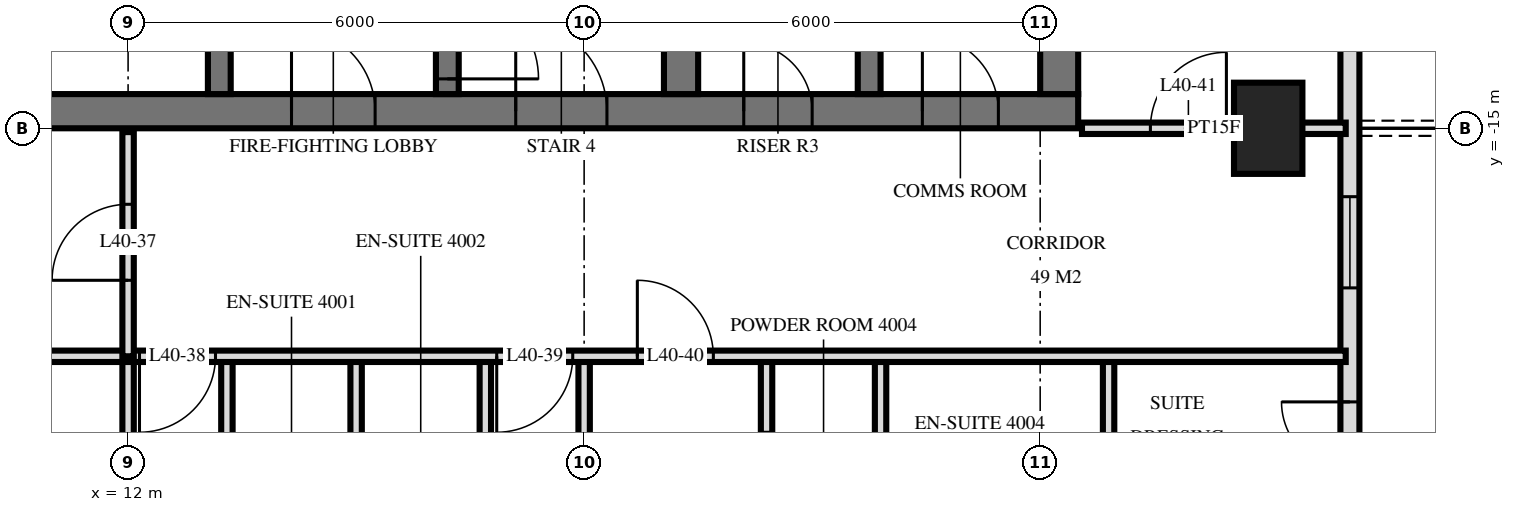
"""IFC4 building model, lengths in metres.
Left out: names, types, materials, properties, quantities, classifications, styles, units other than length and angle.
Written with IfcOpenShell. Run it as: python <this file> out.ifc"""

import sys

from ifc_helpers import new_model, si_unit, direction, frame, frame_2d, origin, origin_2d, place, context, subcontext, project, spatial, rectangle, extrude, element, fill, save


model = new_model("IFC4")
c1 = context("Model", 3, precision=1e-05, world=origin(), true_north=direction((0.0, 1.0)))
c2 = subcontext(c1, "Body", "Model", "MODEL_VIEW")
j1 = project(units=[si_unit("LENGTHUNIT", "METRE"), si_unit("PLANEANGLEUNIT", "RADIAN")], contexts=[c1])
p1 = place(None, origin())
s1 = spatial("IfcSite", under=j1, at=p1, CompositionType="ELEMENT")
p2 = place(p1, origin())
s2 = spatial("IfcBuilding", under=s1, at=p2, CompositionType="ELEMENT")
p3 = place(p2, frame((0.0, 0.0, 156.0)))
s3 = spatial("IfcBuildingStorey", under=s2, at=p3, CompositionType="ELEMENT", Elevation=156.0)
p4 = place(p3, frame((27.0, -15.0, 0.0), z_axis=(0.0, 0.0, 1.0), x_axis=(0.0, 1.0, 0.0)))
e1 = element("IfcColumn", 1, at=p4, inside=s3, PredefinedType="COLUMN", context=c2, shape_type="SweptSolid", body=[
    extrude(rectangle(XDim=1.2, YDim=0.9, at=origin_2d()), origin(), (0.0, 0.0, 1.0), 3.6),
])
p5 = place(p3, frame((10.0, -14.775, 0.0), z_axis=(0.0, 0.0, 1.0), x_axis=(1.0, 0.0, 0.0)))
e2 = element("IfcWall", 2, at=p5, inside=s3, PredefinedType="SHEAR", context=c2, shape_type="SweptSolid", body=[
    extrude(rectangle(XDim=14.5, YDim=0.45, at=frame_2d((7.25, 0.0))), origin(), (0.0, 0.0, 1.0), 3.6),
])
p6 = place(p5, frame((7.1, 0.0, 0.0)))
e3 = element("IfcOpeningElement", 3, at=p6, cuts=e2, PredefinedType="OPENING", context=c2, shape_type="SweptSolid", body=[
    extrude(rectangle(XDim=1.2, YDim=2.1, at=frame_2d((0.6, 1.05))), frame((0.0, 0.235, 0.0), z_axis=(0.0, -1.0, 0.0), x_axis=(1.0, 0.0, 0.0)), (0.0, 0.0, 1.0), 0.47),
])
p7 = place(p5, frame((4.15, 0.0, 0.0)))
e4 = element("IfcOpeningElement", 4, at=p7, cuts=e2, PredefinedType="OPENING", context=c2, shape_type="SweptSolid", body=[
    extrude(rectangle(XDim=1.1, YDim=2.1, at=frame_2d((0.55, 1.05))), frame((0.0, 0.235, 0.0), z_axis=(0.0, -1.0, 0.0), x_axis=(1.0, 0.0, 0.0)), (0.0, 0.0, 1.0), 0.47),
])
p8 = place(p5, frame((10.1, 0.0, 0.0)))
e5 = element("IfcOpeningElement", 5, at=p8, cuts=e2, PredefinedType="OPENING", context=c2, shape_type="SweptSolid", body=[
    extrude(rectangle(XDim=0.9, YDim=2.1, at=frame_2d((0.45, 1.05))), frame((0.0, 0.235, 0.0), z_axis=(0.0, -1.0, 0.0), x_axis=(1.0, 0.0, 0.0)), (0.0, 0.0, 1.0), 0.47),
])
p9 = place(p5, frame((12.45, 0.0, 0.0)))
e6 = element("IfcOpeningElement", 6, at=p9, cuts=e2, PredefinedType="OPENING", context=c2, shape_type="SweptSolid", body=[
    extrude(rectangle(XDim=1.0, YDim=2.1, at=frame_2d((0.5, 1.05))), frame((0.0, 0.235, 0.0), z_axis=(0.0, -1.0, 0.0), x_axis=(1.0, 0.0, 0.0)), (0.0, 0.0, 1.0), 0.47),
])
p10 = place(p3, frame((24.25, -14.55, 0.0), z_axis=(0.0, 0.0, 1.0), x_axis=(0.0, 1.0, 0.0)))
e7 = element("IfcWall", 7, at=p10, inside=s3, PredefinedType="SHEAR", context=c2, shape_type="SweptSolid", body=[
    extrude(rectangle(XDim=14.1, YDim=0.5, at=frame_2d((7.05, 0.0))), origin(), (0.0, 0.0, 1.0), 3.6),
])
p11 = place(p3, frame((13.2, -14.55, 0.0), z_axis=(0.0, 0.0, 1.0), x_axis=(0.0, 1.0, 0.0)))
e8 = element("IfcWall", 8, at=p11, inside=s3, PredefinedType="SHEAR", context=c2, shape_type="SweptSolid", body=[
    extrude(rectangle(XDim=5.4, YDim=0.3, at=frame_2d((2.7, 0.0))), origin(), (0.0, 0.0, 1.0), 3.6),
])
p12 = place(p11, frame((4.0, 0.0, 0.0)))
e9 = element("IfcOpeningElement", 9, at=p12, cuts=e8, PredefinedType="OPENING", context=c2, shape_type="SweptSolid", body=[
    extrude(rectangle(XDim=1.2, YDim=2.1, at=frame_2d((0.6, 1.05))), frame((0.0, 0.16, 0.0), z_axis=(0.0, -1.0, 0.0), x_axis=(1.0, 0.0, 0.0)), (0.0, 0.0, 1.0), 0.32),
])
p13 = place(p3, frame((16.2, -14.55, 0.0), z_axis=(0.0, 0.0, 1.0), x_axis=(0.0, 1.0, 0.0)))
e10 = element("IfcWall", 10, at=p13, inside=s3, PredefinedType="SHEAR", context=c2, shape_type="SweptSolid", body=[
    extrude(rectangle(XDim=5.4, YDim=0.3, at=frame_2d((2.7, 0.0))), origin(), (0.0, 0.0, 1.0), 3.6),
])
p14 = place(p13, frame((0.2, 0.0, 0.0)))
e11 = element("IfcOpeningElement", 11, at=p14, cuts=e10, PredefinedType="OPENING", context=c2, shape_type="SweptSolid", body=[
    extrude(rectangle(XDim=1.2, YDim=2.1, at=frame_2d((0.6, 1.05))), frame((0.0, 0.16, 0.0), z_axis=(0.0, -1.0, 0.0), x_axis=(1.0, 0.0, 0.0)), (0.0, 0.0, 1.0), 0.32),
])
p15 = place(p3, frame((19.275, -14.55, 0.0), z_axis=(0.0, 0.0, 1.0), x_axis=(0.0, 1.0, 0.0)))
e12 = element("IfcWall", 12, at=p15, inside=s3, PredefinedType="SHEAR", context=c2, shape_type="SweptSolid", body=[
    extrude(rectangle(XDim=5.4, YDim=0.45, at=frame_2d((2.7, 0.0))), origin(), (0.0, 0.0, 1.0), 3.6),
])
p16 = place(p3, frame((21.75, -14.55, 0.0), z_axis=(0.0, 0.0, 1.0), x_axis=(0.0, 1.0, 0.0)))
e13 = element("IfcWall", 13, at=p16, inside=s3, PredefinedType="SHEAR", context=c2, shape_type="SweptSolid", body=[
    extrude(rectangle(XDim=5.4, YDim=0.3, at=frame_2d((2.7, 0.0))), origin(), (0.0, 0.0, 1.0), 3.6),
])
p17 = place(p3, frame((28.075, -29.275, 0.0), z_axis=(0.0, 0.0, 1.0), x_axis=(0.0, 1.0, 0.0)))
e14 = element("IfcWall", 14, at=p17, inside=s3, PredefinedType="SOLIDWALL", context=c2, shape_type="SweptSolid", body=[
    extrude(rectangle(XDim=25.951, YDim=0.25, at=frame_2d((12.975, 0.0))), origin(), (0.0, 0.0, 1.0), 3.32),
])
p18 = place(p17, frame((0.575, 0.0, 0.0)))
e15 = element("IfcOpeningElement", 15, at=p18, cuts=e14, PredefinedType="OPENING", context=c2, shape_type="SweptSolid", body=[
    extrude(rectangle(XDim=1.8, YDim=2.4, at=frame_2d((0.9, 1.2))), frame((0.0, 0.135, 0.0), z_axis=(0.0, -1.0, 0.0), x_axis=(1.0, 0.0, 0.0)), (0.0, 0.0, 1.0), 0.27),
])
p19 = place(p17, frame((3.325, 0.0, 0.3)))
e16 = element("IfcOpeningElement", 16, at=p19, cuts=e14, PredefinedType="OPENING", context=c2, shape_type="SweptSolid", body=[
    extrude(rectangle(XDim=1.8, YDim=2.1, at=frame_2d((0.9, 1.05))), frame((0.0, 0.135, 0.0), z_axis=(0.0, -1.0, 0.0), x_axis=(1.0, 0.0, 0.0)), (0.0, 0.0, 1.0), 0.27),
])
p20 = place(p17, frame((8.875, 0.0, 0.0)))
e17 = element("IfcOpeningElement", 17, at=p20, cuts=e14, PredefinedType="OPENING", context=c2, shape_type="SweptSolid", body=[
    extrude(rectangle(XDim=1.8, YDim=2.4, at=frame_2d((0.9, 1.2))), frame((0.0, 0.135, 0.0), z_axis=(0.0, -1.0, 0.0), x_axis=(1.0, 0.0, 0.0)), (0.0, 0.0, 1.0), 0.27),
])
p21 = place(p17, frame((12.175, 0.0, 0.3)))
e18 = element("IfcOpeningElement", 18, at=p21, cuts=e14, PredefinedType="OPENING", context=c2, shape_type="SweptSolid", body=[
    extrude(rectangle(XDim=1.2, YDim=2.1, at=frame_2d((0.6, 1.05))), frame((0.0, 0.135, 0.0), z_axis=(0.0, -1.0, 0.0), x_axis=(1.0, 0.0, 0.0)), (0.0, 0.0, 1.0), 0.27),
])
p22 = place(p17, frame((17.5, 0.0, 0.0)))
e19 = element("IfcOpeningElement", 19, at=p22, cuts=e14, PredefinedType="OPENING", context=c2, shape_type="SweptSolid", body=[
    extrude(rectangle(XDim=1.8, YDim=2.4, at=frame_2d((0.9, 1.2))), frame((0.0, 0.135, 0.0), z_axis=(0.0, -1.0, 0.0), x_axis=(1.0, 0.0, 0.0)), (0.0, 0.0, 1.0), 0.27),
])
p23 = place(p3, frame((24.9, -21.0, 0.0), z_axis=(0.0, 0.0, 1.0), x_axis=(0.0, 1.0, 0.0)))
e20 = element("IfcWall", 20, at=p23, inside=s3, PredefinedType="PARTITIONING", context=c2, shape_type="SweptSolid", body=[
    extrude(rectangle(XDim=3.0, YDim=0.15, at=frame_2d((1.5, 0.0))), origin(), (0.0, 0.0, 1.0), 3.32),
])
p24 = place(p3, frame((21.9, -21.0, 0.0), z_axis=(0.0, 0.0, 1.0), x_axis=(0.0, 1.0, 0.0)))
e21 = element("IfcWall", 21, at=p24, inside=s3, PredefinedType="PLUMBINGWALL", context=c2, shape_type="SweptSolid", body=[
    extrude(rectangle(XDim=3.0, YDim=0.15, at=frame_2d((1.5, 0.0))), origin(), (0.0, 0.0, 1.0), 3.32),
])
p25 = place(p3, frame((20.4, -21.0, 0.0), z_axis=(0.0, 0.0, 1.0), x_axis=(0.0, 1.0, 0.0)))
e22 = element("IfcWall", 22, at=p25, inside=s3, PredefinedType="PARTITIONING", context=c2, shape_type="SweptSolid", body=[
    extrude(rectangle(XDim=3.0, YDim=0.15, at=frame_2d((1.5, 0.0))), origin(), (0.0, 0.0, 1.0), 3.32),
])
p26 = place(p25, frame((1.0, 0.0, 0.0)))
e23 = element("IfcOpeningElement", 23, at=p26, cuts=e22, PredefinedType="OPENING", context=c2, shape_type="SweptSolid", body=[
    extrude(rectangle(XDim=1.0, YDim=2.1, at=frame_2d((0.5, 1.05))), frame((0.0, 0.085, 0.0), z_axis=(0.0, -1.0, 0.0), x_axis=(1.0, 0.0, 0.0)), (0.0, 0.0, 1.0), 0.17),
])
p27 = place(p3, frame((18.0, -21.0, 0.0), z_axis=(0.0, 0.0, 1.0), x_axis=(0.0, 1.0, 0.0)))
e24 = element("IfcWall", 24, at=p27, inside=s3, PredefinedType="PARTITIONING", context=c2, shape_type="SweptSolid", body=[
    extrude(rectangle(XDim=3.0, YDim=0.15, at=frame_2d((1.5, 0.0))), origin(), (0.0, 0.0, 1.0), 3.32),
])
p28 = place(p3, frame((16.7, -21.8, 0.0), z_axis=(0.0, 0.0, 1.0), x_axis=(0.0, 1.0, 0.0)))
e25 = element("IfcWall", 25, at=p28, inside=s3, PredefinedType="PARTITIONING", context=c2, shape_type="SweptSolid", body=[
    extrude(rectangle(XDim=3.8, YDim=0.15, at=frame_2d((1.9, 0.0))), origin(), (0.0, 0.0, 1.0), 3.32),
])
p29 = place(p28, frame((1.5, 0.0, 0.0)))
e26 = element("IfcOpeningElement", 26, at=p29, cuts=e25, PredefinedType="OPENING", context=c2, shape_type="SweptSolid", body=[
    extrude(rectangle(XDim=0.8, YDim=2.1, at=frame_2d((0.4, 1.05))), frame((0.0, 0.085, 0.0), z_axis=(0.0, -1.0, 0.0), x_axis=(1.0, 0.0, 0.0)), (0.0, 0.0, 1.0), 0.17),
])
p30 = place(p3, frame((15.0, -33.62, 0.0), z_axis=(0.0, 0.0, 1.0), x_axis=(0.0, 1.0, 0.0)))
e27 = element("IfcWall", 27, at=p30, inside=s3, PredefinedType="PARTITIONING", context=c2, shape_type="SweptSolid", body=[
    extrude(rectangle(XDim=15.62, YDim=0.15, at=frame_2d((7.81, 0.0))), origin(), (0.0, 0.0, 1.0), 3.32),
])
p31 = place(p3, frame((13.3, -21.8, 0.0), z_axis=(0.0, 0.0, 1.0), x_axis=(0.0, 1.0, 0.0)))
e28 = element("IfcWall", 28, at=p31, inside=s3, PredefinedType="PARTITIONING", context=c2, shape_type="SweptSolid", body=[
    extrude(rectangle(XDim=3.8, YDim=0.15, at=frame_2d((1.9, 0.0))), origin(), (0.0, 0.0, 1.0), 3.32),
])
p32 = place(p31, frame((1.5, 0.0, 0.0)))
e29 = element("IfcOpeningElement", 29, at=p32, cuts=e28, PredefinedType="OPENING", context=c2, shape_type="SweptSolid", body=[
    extrude(rectangle(XDim=0.8, YDim=2.1, at=frame_2d((0.4, 1.05))), frame((0.0, 0.085, 0.0), z_axis=(0.0, -1.0, 0.0), x_axis=(1.0, 0.0, 0.0)), (0.0, 0.0, 1.0), 0.17),
])
p33 = place(p3, frame((12.0, -18.0, 0.0), z_axis=(0.0, 0.0, 1.0), x_axis=(0.0, 1.0, 0.0)))
e30 = element("IfcWall", 30, at=p33, inside=s3, PredefinedType="PARTITIONING", context=c2, shape_type="SweptSolid", body=[
    extrude(rectangle(XDim=2.95, YDim=0.15, at=frame_2d((1.475, 0.0))), origin(), (0.0, 0.0, 1.0), 3.32),
])
p34 = place(p33, frame((1.0, 0.0, 0.0)))
e31 = element("IfcOpeningElement", 31, at=p34, cuts=e30, PredefinedType="OPENING", context=c2, shape_type="SweptSolid", body=[
    extrude(rectangle(XDim=1.0, YDim=2.1, at=frame_2d((0.5, 1.05))), frame((0.0, 0.085, 0.0), z_axis=(0.0, -1.0, 0.0), x_axis=(1.0, 0.0, 0.0)), (0.0, 0.0, 1.0), 0.17),
])
p35 = place(p3, frame((12.0, -33.62, 0.0), z_axis=(0.0, 0.0, 1.0), x_axis=(0.0, 1.0, 0.0)))
e32 = element("IfcWall", 32, at=p35, inside=s3, PredefinedType="PARTITIONING", context=c2, shape_type="SweptSolid", body=[
    extrude(rectangle(XDim=15.62, YDim=0.15, at=frame_2d((7.81, 0.0))), origin(), (0.0, 0.0, 1.0), 3.32),
])
p36 = place(p3, frame((-28.02, -18.0, 0.0), z_axis=(0.0, 0.0, 1.0), x_axis=(1.0, 0.0, 0.0)))
e33 = element("IfcWall", 33, at=p36, inside=s3, PredefinedType="PARTITIONING", context=c2, shape_type="SweptSolid", body=[
    extrude(rectangle(XDim=56.04, YDim=0.15, at=frame_2d((28.02, 0.0))), origin(), (0.0, 0.0, 1.0), 3.32),
])
p37 = place(p36, frame((12.52, 0.0, 0.0)))
e34 = element("IfcOpeningElement", 34, at=p37, cuts=e33, PredefinedType="OPENING", context=c2, shape_type="SweptSolid", body=[
    extrude(rectangle(XDim=1.0, YDim=2.1, at=frame_2d((0.5, 1.05))), frame((0.0, 0.085, 0.0), z_axis=(0.0, -1.0, 0.0), x_axis=(1.0, 0.0, 0.0)), (0.0, 0.0, 1.0), 0.17),
])
p38 = place(p36, frame((8.32, 0.0, 0.0)))
e35 = element("IfcOpeningElement", 35, at=p38, cuts=e33, PredefinedType="OPENING", context=c2, shape_type="SweptSolid", body=[
    extrude(rectangle(XDim=1.0, YDim=2.1, at=frame_2d((0.5, 1.05))), frame((0.0, 0.085, 0.0), z_axis=(0.0, -1.0, 0.0), x_axis=(1.0, 0.0, 0.0)), (0.0, 0.0, 1.0), 0.17),
])
p39 = place(p36, frame((40.17, 0.0, 0.0)))
e36 = element("IfcOpeningElement", 36, at=p39, cuts=e33, PredefinedType="OPENING", context=c2, shape_type="SweptSolid", body=[
    extrude(rectangle(XDim=1.0, YDim=2.1, at=frame_2d((0.5, 1.05))), frame((0.0, 0.085, 0.0), z_axis=(0.0, -1.0, 0.0), x_axis=(1.0, 0.0, 0.0)), (0.0, 0.0, 1.0), 0.17),
])
p40 = place(p36, frame((44.87, 0.0, 0.0)))
e37 = element("IfcOpeningElement", 37, at=p40, cuts=e33, PredefinedType="OPENING", context=c2, shape_type="SweptSolid", body=[
    extrude(rectangle(XDim=1.0, YDim=2.1, at=frame_2d((0.5, 1.05))), frame((0.0, 0.085, 0.0), z_axis=(0.0, -1.0, 0.0), x_axis=(1.0, 0.0, 0.0)), (0.0, 0.0, 1.0), 0.17),
])
p41 = place(p36, frame((46.72, 0.0, 0.0)))
e38 = element("IfcOpeningElement", 38, at=p41, cuts=e33, PredefinedType="OPENING", context=c2, shape_type="SweptSolid", body=[
    extrude(rectangle(XDim=1.0, YDim=2.1, at=frame_2d((0.5, 1.05))), frame((0.0, 0.085, 0.0), z_axis=(0.0, -1.0, 0.0), x_axis=(1.0, 0.0, 0.0)), (0.0, 0.0, 1.0), 0.17),
])
p42 = place(p36, frame((18.52, 0.0, 0.0)))
e39 = element("IfcOpeningElement", 39, at=p42, cuts=e33, PredefinedType="OPENING", context=c2, shape_type="SweptSolid", body=[
    extrude(rectangle(XDim=1.0, YDim=2.1, at=frame_2d((0.5, 1.05))), frame((0.0, 0.085, 0.0), z_axis=(0.0, -1.0, 0.0), x_axis=(1.0, 0.0, 0.0)), (0.0, 0.0, 1.0), 0.17),
])
p43 = place(p36, frame((24.52, 0.0, 0.0)))
e40 = element("IfcOpeningElement", 40, at=p43, cuts=e33, PredefinedType="OPENING", context=c2, shape_type="SweptSolid", body=[
    extrude(rectangle(XDim=1.0, YDim=2.1, at=frame_2d((0.5, 1.05))), frame((0.0, 0.085, 0.0), z_axis=(0.0, -1.0, 0.0), x_axis=(1.0, 0.0, 0.0)), (0.0, 0.0, 1.0), 0.17),
])
p44 = place(p36, frame((30.52, 0.0, 0.0)))
e41 = element("IfcOpeningElement", 41, at=p44, cuts=e33, PredefinedType="OPENING", context=c2, shape_type="SweptSolid", body=[
    extrude(rectangle(XDim=1.0, YDim=2.1, at=frame_2d((0.5, 1.05))), frame((0.0, 0.085, 0.0), z_axis=(0.0, -1.0, 0.0), x_axis=(1.0, 0.0, 0.0)), (0.0, 0.0, 1.0), 0.17),
])
p45 = place(p36, frame((36.52, 0.0, 0.0)))
e42 = element("IfcOpeningElement", 42, at=p45, cuts=e33, PredefinedType="OPENING", context=c2, shape_type="SweptSolid", body=[
    extrude(rectangle(XDim=1.0, YDim=2.1, at=frame_2d((0.5, 1.05))), frame((0.0, 0.085, 0.0), z_axis=(0.0, -1.0, 0.0), x_axis=(1.0, 0.0, 0.0)), (0.0, 0.0, 1.0), 0.17),
])
p46 = place(p3, frame((24.55, -15.0, 0.0), z_axis=(0.0, 0.0, 1.0), x_axis=(1.0, 0.0, 0.0)))
e43 = element("IfcWall", 43, at=p46, inside=s3, PredefinedType="PARTITIONING", context=c2, shape_type="SweptSolid", body=[
    extrude(rectangle(XDim=3.47, YDim=0.15, at=frame_2d((1.735, 0.0))), origin(), (0.0, 0.0, 1.0), 3.32),
])
p47 = place(p46, frame((0.9, 0.0, 0.0)))
e44 = element("IfcOpeningElement", 44, at=p47, cuts=e43, PredefinedType="OPENING", context=c2, shape_type="SweptSolid", body=[
    extrude(rectangle(XDim=1.0, YDim=2.1, at=frame_2d((0.5, 1.05))), frame((0.0, 0.085, 0.0), z_axis=(0.0, -1.0, 0.0), x_axis=(1.0, 0.0, 0.0)), (0.0, 0.0, 1.0), 0.17),
])
p48 = place(p20, origin())
e45 = element("IfcDoor", 45, at=p48, inside=s3, OperationType="DOUBLE_DOOR_SINGLE_SWING", PredefinedType="DOOR", context=c2, shape_type="SweptSolid", body=[
    extrude(rectangle(XDim=1.8, YDim=2.4, at=frame_2d((0.9, 1.2))), frame((0.0, 0.025, 0.0), z_axis=(0.0, -1.0, 0.0), x_axis=(1.0, 0.0, 0.0)), (0.0, 0.0, 1.0), 0.05),
])
fill(e17, e45)
p49 = place(p21, origin())
e46 = element("IfcWindow", 46, at=p49, inside=s3, PartitioningType="SINGLE_PANEL", PredefinedType="WINDOW", context=c2, shape_type="SweptSolid", body=[
    extrude(rectangle(XDim=1.2, YDim=2.1, at=frame_2d((0.6, 1.05))), frame((0.0, 0.03, 0.0), z_axis=(0.0, -1.0, 0.0), x_axis=(1.0, 0.0, 0.0)), (0.0, 0.0, 1.0), 0.06),
])
fill(e18, e46)
p50 = place(p6, origin())
e47 = element("IfcDoor", 47, at=p50, inside=s3, OperationType="SINGLE_SWING_RIGHT", PredefinedType="DOOR", context=c2, shape_type="SweptSolid", body=[
    extrude(rectangle(XDim=1.2, YDim=2.1, at=frame_2d((0.6, 1.05))), frame((0.0, 0.025, 0.0), z_axis=(0.0, -1.0, 0.0), x_axis=(1.0, 0.0, 0.0)), (0.0, 0.0, 1.0), 0.05),
])
fill(e3, e47)
p51 = place(p7, origin())
e48 = element("IfcDoor", 48, at=p51, inside=s3, OperationType="SINGLE_SWING_RIGHT", PredefinedType="DOOR", context=c2, shape_type="SweptSolid", body=[
    extrude(rectangle(XDim=1.1, YDim=2.1, at=frame_2d((0.55, 1.05))), frame((0.0, 0.025, 0.0), z_axis=(0.0, -1.0, 0.0), x_axis=(1.0, 0.0, 0.0)), (0.0, 0.0, 1.0), 0.05),
])
fill(e4, e48)
p52 = place(p8, origin())
e49 = element("IfcDoor", 49, at=p52, inside=s3, OperationType="SINGLE_SWING_RIGHT", PredefinedType="DOOR", context=c2, shape_type="SweptSolid", body=[
    extrude(rectangle(XDim=0.9, YDim=2.1, at=frame_2d((0.45, 1.05))), frame((0.0, 0.025, 0.0), z_axis=(0.0, -1.0, 0.0), x_axis=(1.0, 0.0, 0.0)), (0.0, 0.0, 1.0), 0.05),
])
fill(e5, e49)
p53 = place(p9, origin())
e50 = element("IfcDoor", 50, at=p53, inside=s3, OperationType="SINGLE_SWING_RIGHT", PredefinedType="DOOR", context=c2, shape_type="SweptSolid", body=[
    extrude(rectangle(XDim=1.0, YDim=2.1, at=frame_2d((0.5, 1.05))), frame((0.0, 0.025, 0.0), z_axis=(0.0, -1.0, 0.0), x_axis=(1.0, 0.0, 0.0)), (0.0, 0.0, 1.0), 0.05),
])
fill(e6, e50)
p54 = place(p14, frame((0.6, 0.0, 0.0), z_axis=(0.0, 0.0, 1.0), x_axis=(-1.0, 0.0, 0.0)))
e51 = element("IfcDoor", 51, at=p54, inside=s3, OperationType="SINGLE_SWING_LEFT", PredefinedType="DOOR", context=c2, shape_type="SweptSolid", body=[
    extrude(rectangle(XDim=1.2, YDim=2.1, at=frame_2d((0.0, 1.05))), frame((0.0, -0.025, 0.0), z_axis=(0.0, 1.0, 0.0), x_axis=(-1.0, 0.0, 0.0)), (0.0, 0.0, 1.0), 0.05),
])
fill(e11, e51)
p55 = place(p34, origin())
e52 = element("IfcDoor", 52, at=p55, inside=s3, OperationType="SINGLE_SWING_RIGHT", PredefinedType="DOOR", context=c2, shape_type="SweptSolid", body=[
    extrude(rectangle(XDim=1.0, YDim=2.1, at=frame_2d((0.5, 1.05))), frame((0.0, 0.025, 0.0), z_axis=(0.0, -1.0, 0.0), x_axis=(1.0, 0.0, 0.0)), (0.0, 0.0, 1.0), 0.05),
])
fill(e31, e52)
p56 = place(p39, frame((0.5, 0.0, 0.0), z_axis=(0.0, 0.0, 1.0), x_axis=(-1.0, 0.0, 0.0)))
e53 = element("IfcDoor", 53, at=p56, inside=s3, OperationType="SINGLE_SWING_LEFT", PredefinedType="DOOR", context=c2, shape_type="SweptSolid", body=[
    extrude(rectangle(XDim=1.0, YDim=2.1, at=frame_2d((0.0, 1.05))), frame((0.0, -0.025, 0.0), z_axis=(0.0, 1.0, 0.0), x_axis=(-1.0, 0.0, 0.0)), (0.0, 0.0, 1.0), 0.05),
])
fill(e36, e53)
p57 = place(p40, frame((0.5, 0.0, 0.0), z_axis=(0.0, 0.0, 1.0), x_axis=(-1.0, 0.0, 0.0)))
e54 = element("IfcDoor", 54, at=p57, inside=s3, OperationType="SINGLE_SWING_LEFT", PredefinedType="DOOR", context=c2, shape_type="SweptSolid", body=[
    extrude(rectangle(XDim=1.0, YDim=2.1, at=frame_2d((0.0, 1.05))), frame((0.0, -0.025, 0.0), z_axis=(0.0, 1.0, 0.0), x_axis=(-1.0, 0.0, 0.0)), (0.0, 0.0, 1.0), 0.05),
])
fill(e37, e54)
p58 = place(p41, origin())
e55 = element("IfcDoor", 55, at=p58, inside=s3, OperationType="SINGLE_SWING_RIGHT", PredefinedType="DOOR", context=c2, shape_type="SweptSolid", body=[
    extrude(rectangle(XDim=1.0, YDim=2.1, at=frame_2d((0.5, 1.05))), frame((0.0, 0.025, 0.0), z_axis=(0.0, -1.0, 0.0), x_axis=(1.0, 0.0, 0.0)), (0.0, 0.0, 1.0), 0.05),
])
fill(e38, e55)
p59 = place(p47, origin())
e56 = element("IfcDoor", 56, at=p59, inside=s3, OperationType="SINGLE_SWING_LEFT", PredefinedType="DOOR", context=c2, shape_type="SweptSolid", body=[
    extrude(rectangle(XDim=1.0, YDim=2.1, at=frame_2d((0.5, 1.05))), frame((0.0, 0.025, 0.0), z_axis=(0.0, -1.0, 0.0), x_axis=(1.0, 0.0, 0.0)), (0.0, 0.0, 1.0), 0.05),
])
fill(e44, e56)
save(model, sys.argv[1])
